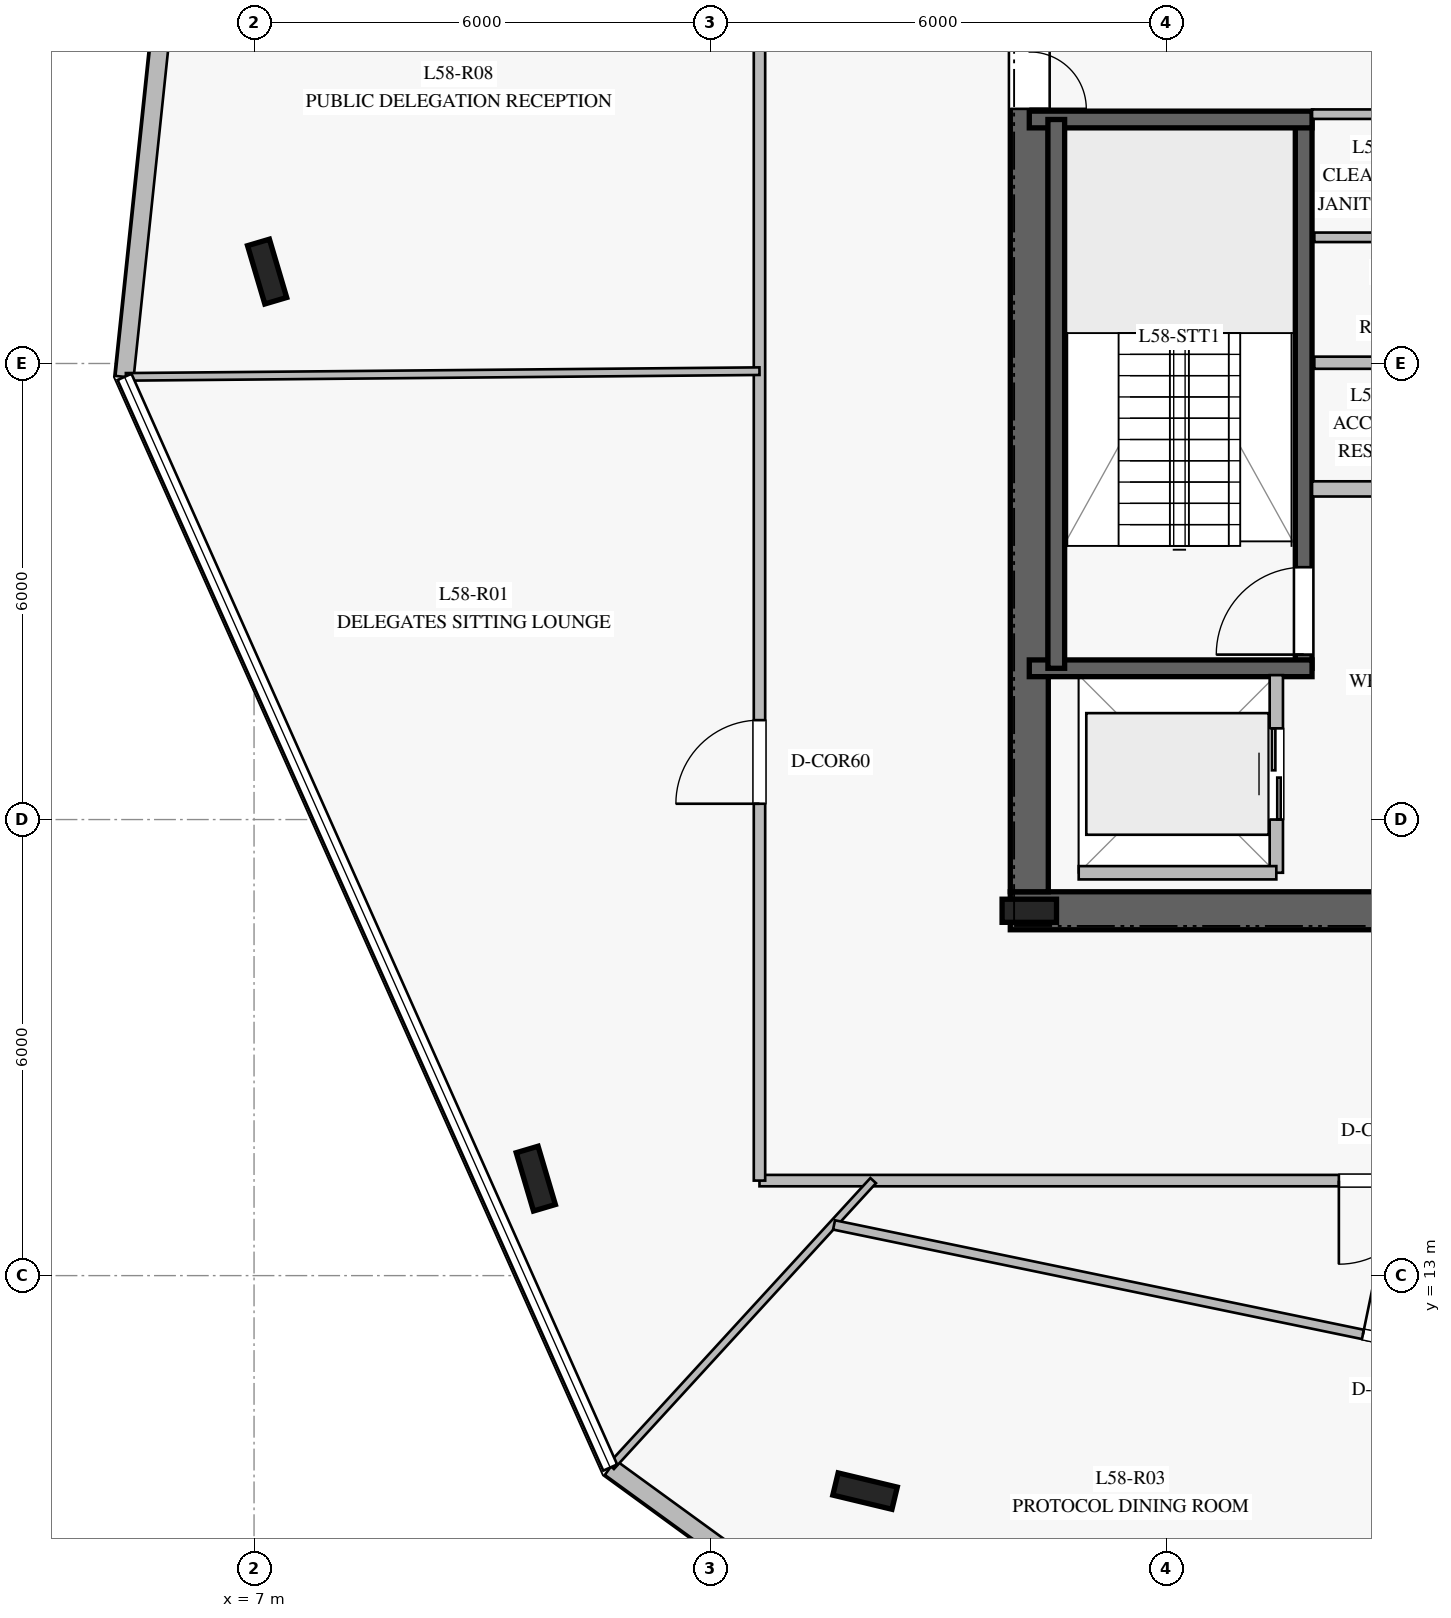
"""IFC4 building model, lengths in metres.
Left out: names, types, materials, properties, quantities, classifications, styles, units other than length and angle.
Written with IfcOpenShell. Run it as: python <this file> out.ifc"""

import sys

from ifc_helpers import new_model, si_unit, direction, frame, frame_2d, origin, origin_2d, place, context, subcontext, project, spatial, rectangle, i_section, extrude, element, fill, save


model = new_model("IFC4")
c1 = context("Model", 3, precision=1e-05, world=origin(), true_north=direction((0.0, 1.0)))
c2 = subcontext(c1, "Body", "Model", "MODEL_VIEW")
j1 = project(units=[si_unit("LENGTHUNIT", "METRE"), si_unit("PLANEANGLEUNIT", "RADIAN")], contexts=[c1])
p1 = place(None, origin())
s1 = spatial("IfcSite", under=j1, at=p1, CompositionType="ELEMENT")
p2 = place(p1, origin())
s2 = spatial("IfcBuilding", under=s1, at=p2, CompositionType="ELEMENT")
p3 = place(p2, frame((0.0, 0.0, 240.8)))
s3 = spatial("IfcBuildingStorey", under=s2, at=p3, CompositionType="ELEMENT", Elevation=240.8)
p4 = place(p3, frame((16.95, 17.8, 0.0), z_axis=(0.0, 0.0, 1.0), x_axis=(1.0, 0.0, 0.0)))
e1 = element("IfcWall", 1, at=p4, inside=s3, PredefinedType="SHEAR", context=c2, shape_type="SweptSolid", body=[
    extrude(rectangle(XDim=16.1, YDim=0.5, at=frame_2d((8.05, 0.0))), origin(), (0.0, 0.0, 1.0), 3.7),
])
p5 = place(p4, frame((5.0, 0.0, 0.0)))
e2 = element("IfcOpeningElement", 2, at=p5, cuts=e1, PredefinedType="OPENING", context=c2, shape_type="SweptSolid", body=[
    extrude(rectangle(XDim=1.2, YDim=2.25, at=frame_2d((0.6, 1.125))), frame((0.0, 0.26, 0.0), z_axis=(0.0, -1.0, 0.0), x_axis=(1.0, 0.0, 0.0)), (0.0, 0.0, 1.0), 0.52),
])
p6 = place(p4, frame((13.95, 0.0, 0.0)))
e3 = element("IfcOpeningElement", 3, at=p6, cuts=e1, PredefinedType="OPENING", context=c2, shape_type="SweptSolid", body=[
    extrude(rectangle(XDim=0.9, YDim=2.1, at=frame_2d((0.45, 1.05))), frame((0.0, 0.26, 0.0), z_axis=(0.0, -1.0, 0.0), x_axis=(1.0, 0.0, 0.0)), (0.0, 0.0, 1.0), 0.52),
])
p7 = place(p4, frame((9.2, 0.0, 0.0)))
e4 = element("IfcOpeningElement", 4, at=p7, cuts=e1, PredefinedType="OPENING", context=c2, shape_type="SweptSolid", body=[
    extrude(rectangle(XDim=1.1, YDim=2.2, at=frame_2d((0.55, 1.1))), frame((0.0, 0.26, 0.0), z_axis=(0.0, -1.0, 0.0), x_axis=(1.0, 0.0, 0.0)), (0.0, 0.0, 1.0), 0.52),
])
p8 = place(p3, frame((17.2, 31.95, 0.0), z_axis=(0.0, 0.0, 1.0), x_axis=(0.0, -1.0, 0.0)))
e5 = element("IfcWall", 5, at=p8, inside=s3, PredefinedType="SHEAR", context=c2, shape_type="SweptSolid", body=[
    extrude(rectangle(XDim=13.9, YDim=0.5, at=frame_2d((6.95, 0.0))), origin(), (0.0, 0.0, 1.0), 3.7),
])
p9 = place(p8, frame((2.1, 0.0, 0.0)))
e6 = element("IfcOpeningElement", 6, at=p9, cuts=e5, PredefinedType="OPENING", context=c2, shape_type="SweptSolid", body=[
    extrude(rectangle(XDim=1.5, YDim=2.2, at=frame_2d((0.75, 1.1))), frame((0.0, 0.26, 0.0), z_axis=(0.0, -1.0, 0.0), x_axis=(1.0, 0.0, 0.0)), (0.0, 0.0, 1.0), 0.52),
])
p10 = place(p3, frame((17.2, 17.8, 0.0), z_axis=(0.0, 0.0, 1.0), x_axis=(1.0, 0.0, 0.0)))
e7 = element("IfcColumn", 7, at=p10, inside=s3, PredefinedType="COLUMN", context=c2, shape_type="SweptSolid", body=[
    extrude(i_section(OverallWidth=0.304, OverallDepth=0.716, WebThickness=0.021, FlangeThickness=0.04, at=origin_2d()), origin(), (0.0, 0.0, 1.0), 4.0),
])
p11 = place(p3, frame((20.81, 20.99, 0.0), z_axis=(0.0, 0.0, 1.0), x_axis=(0.0, 1.0, 0.0)))
e8 = element("IfcWall", 8, at=p11, inside=s3, PredefinedType="SOLIDWALL", context=c2, shape_type="SweptSolid", body=[
    extrude(rectangle(XDim=7.22, YDim=0.22, at=frame_2d((3.61, 0.0))), origin(), (0.0, 0.0, 1.0), 3.7),
])
p12 = place(p11, frame((0.18, 0.0, 0.0)))
e9 = element("IfcOpeningElement", 9, at=p12, cuts=e8, PredefinedType="OPENING", context=c2, shape_type="SweptSolid", body=[
    extrude(rectangle(XDim=1.15, YDim=2.2, at=frame_2d((0.575, 1.1))), frame((0.0, 0.12, 0.0), z_axis=(0.0, -1.0, 0.0), x_axis=(1.0, 0.0, 0.0)), (0.0, 0.0, 1.0), 0.24),
])
for number, where, z_axis, x_axis in (
    (10, (17.2, 20.99, 0.0), (0.0, 0.0, 1.0), (1.0, 0.0, 0.0)),
    (11, (17.2, 28.21, 0.0), (0.0, 0.0, 1.0), (1.0, 0.0, 0.0)),
):
    element("IfcWall", number, at=place(p3, frame(where, z_axis=z_axis, x_axis=x_axis)), inside=s3, PredefinedType="SOLIDWALL", context=c2, shape_type="SweptSolid", body=[
        extrude(rectangle(XDim=3.72, YDim=0.22, at=frame_2d((1.86, 0.0))), origin(), (0.0, 0.0, 1.0), 3.7),
    ])
p13 = place(p3, frame((17.555, 28.21, 0.0), z_axis=(0.0, 0.0, 1.0), x_axis=(0.0, -1.0, 0.0)))
e12 = element("IfcWall", 12, at=p13, inside=s3, PredefinedType="SOLIDWALL", context=c2, shape_type="SweptSolid", body=[
    extrude(rectangle(XDim=7.22, YDim=0.22, at=frame_2d((3.61, 0.0))), origin(), (0.0, 0.0, 1.0), 3.7),
])
for number, where, z_axis, x_axis in (
    (13, (7.172, 26.209, 0.0), (0.0, 0.0, 1.0), (-0.284, 0.959, 0.0)),
    (14, (10.707, 14.276, 0.0), (0.0, 0.0, 1.0), (-0.284, 0.959, 0.0)),
    (15, (15.039, 10.165, 0.0), (0.0, 0.0, 1.0), (-0.972, 0.233, 0.0)),
):
    element("IfcColumn", number, at=place(p3, frame(where, z_axis=z_axis, x_axis=x_axis)), inside=s3, PredefinedType="COLUMN", context=c2, shape_type="SweptSolid", body=[
        extrude(i_section(OverallWidth=0.3, OverallDepth=0.8, WebThickness=0.018, FlangeThickness=0.033, at=origin_2d()), origin(), (0.0, 0.0, 1.0), 4.0),
    ])
p14 = place(p3, frame((5.764, 29.269, 0.0), z_axis=(0.0, 0.0, 1.0), x_axis=(-0.104710374516, -0.994502758904, 0.0)))
e16 = element("IfcWall", 16, at=p14, inside=s3, PredefinedType="STANDARD", context=c2, shape_type="SweptSolid", body=[
    extrude(rectangle(XDim=4.47, YDim=0.24, at=frame_2d((2.235, 0.0))), origin(), (0.0, 0.0, 1.0), 3.7),
])
p15 = place(p3, frame((11.686, 10.475, 0.0), z_axis=(0.0, 0.0, 1.0), x_axis=(0.808861298874, -0.587999489102, 0.0)))
e17 = element("IfcWall", 17, at=p15, inside=s3, PredefinedType="STANDARD", context=c2, shape_type="SweptSolid", body=[
    extrude(rectangle(XDim=4.468, YDim=0.24, at=frame_2d((2.234, 0.0))), origin(), (0.0, 0.0, 1.0), 3.7),
])
p16 = place(p3, frame((20.92, 23.35, 0.0), z_axis=(0.0, 0.0, 1.0), x_axis=(1.0, 0.0, 0.0)))
e18 = element("IfcWall", 18, at=p16, inside=s3, PredefinedType="PARTITIONING", context=c2, shape_type="SweptSolid", body=[
    extrude(rectangle(XDim=3.38, YDim=0.2, at=frame_2d((1.69, 0.0))), origin(), (0.0, 0.0, 1.0), 3.7),
])
p17 = place(p3, frame((20.92, 28.28, 0.0), z_axis=(0.0, 0.0, 1.0), x_axis=(1.0, 0.0, 0.0)))
e19 = element("IfcWall", 19, at=p17, inside=s3, PredefinedType="PARTITIONING", context=c2, shape_type="SweptSolid", body=[
    extrude(rectangle(XDim=3.405, YDim=0.125, at=frame_2d((1.703, 0.0))), origin(), (0.0, 0.0, 1.0), 3.7),
])
p18 = place(p3, frame((20.95, 25.01, 0.0), z_axis=(0.0, 0.0, 1.0), x_axis=(1.0, 0.0, 0.0)))
e20 = element("IfcWall", 20, at=p18, inside=s3, PredefinedType="PLUMBINGWALL", context=c2, shape_type="SweptSolid", body=[
    extrude(rectangle(XDim=3.3, YDim=0.16, at=frame_2d((1.65, 0.0))), origin(), (0.0, 0.0, 1.0), 3.7),
])
p19 = place(p3, frame((20.95, 26.66, 0.0), z_axis=(0.0, 0.0, 1.0), x_axis=(1.0, 0.0, 0.0)))
e21 = element("IfcWall", 21, at=p19, inside=s3, PredefinedType="PARTITIONING", context=c2, shape_type="SweptSolid", body=[
    extrude(rectangle(XDim=3.3, YDim=0.125, at=frame_2d((1.65, 0.0))), origin(), (0.0, 0.0, 1.0), 3.7),
])
p20 = place(p3, frame((20.45, 18.3, 0.0), z_axis=(0.0, 0.0, 1.0), x_axis=(0.0, 1.0, 0.0)))
e22 = element("IfcWall", 22, at=p20, inside=s3, PredefinedType="PARTITIONING", context=c2, shape_type="SweptSolid", body=[
    extrude(rectangle(XDim=2.6, YDim=0.175, at=frame_2d((1.3, 0.0))), origin(), (0.0, 0.0, 1.0), 3.7),
])
p21 = place(p20, frame((0.7, 0.0, 0.0)))
e23 = element("IfcOpeningElement", 23, at=p21, cuts=e22, PredefinedType="OPENING", context=c2, shape_type="SweptSolid", body=[
    extrude(rectangle(XDim=1.2, YDim=2.2, at=frame_2d((0.6, 1.1))), frame((0.0, 0.098, 0.0), z_axis=(0.0, -1.0, 0.0), x_axis=(1.0, 0.0, 0.0)), (0.0, 0.0, 1.0), 0.195),
])
p22 = place(p3, frame((17.85, 18.3, 0.0), z_axis=(0.0, 0.0, 1.0), x_axis=(1.0, 0.0, 0.0)))
e24 = element("IfcWall", 24, at=p22, inside=s3, PredefinedType="PARTITIONING", context=c2, shape_type="SweptSolid", body=[
    extrude(rectangle(XDim=2.6, YDim=0.175, at=frame_2d((1.3, 0.0))), origin(), (0.0, 0.0, 1.0), 3.7),
])
p23 = place(p3, frame((36.35, 14.25, 0.0), z_axis=(0.0, 0.0, 1.0), x_axis=(-1.0, 0.0, 0.0)))
e25 = element("IfcWall", 25, at=p23, inside=s3, PredefinedType="PARTITIONING", context=c2, shape_type="SweptSolid", body=[
    extrude(rectangle(XDim=22.7, YDim=0.15, at=frame_2d((11.35, 0.0))), origin(), (0.0, 0.0, 1.0), 3.2),
])
p24 = place(p23, frame((13.977, 0.0, 0.0)))
e26 = element("IfcOpeningElement", 26, at=p24, cuts=e25, PredefinedType="OPENING", context=c2, shape_type="SweptSolid", body=[
    extrude(rectangle(XDim=1.1, YDim=2.2, at=frame_2d((0.55, 1.1))), frame((0.0, 0.085, 0.0), z_axis=(0.0, -1.0, 0.0), x_axis=(1.0, 0.0, 0.0)), (0.0, 0.0, 1.0), 0.17),
])
p25 = place(p3, frame((13.65, 14.25, 0.0), z_axis=(0.0, 0.0, 1.0), x_axis=(0.0, 1.0, 0.0)))
e27 = element("IfcWall", 27, at=p25, inside=s3, PredefinedType="PARTITIONING", context=c2, shape_type="SweptSolid", body=[
    extrude(rectangle(XDim=21.5, YDim=0.15, at=frame_2d((10.75, 0.0))), origin(), (0.0, 0.0, 1.0), 3.2),
])
p26 = place(p25, frame((4.958, 0.0, 0.0)))
e28 = element("IfcOpeningElement", 28, at=p26, cuts=e27, PredefinedType="OPENING", context=c2, shape_type="SweptSolid", body=[
    extrude(rectangle(XDim=1.1, YDim=2.2, at=frame_2d((0.55, 1.1))), frame((0.0, 0.085, 0.0), z_axis=(0.0, -1.0, 0.0), x_axis=(1.0, 0.0, 0.0)), (0.0, 0.0, 1.0), 0.17),
])
p27 = place(p25, frame((15.251, 0.0, 0.0)))
e29 = element("IfcOpeningElement", 29, at=p27, cuts=e27, PredefinedType="OPENING", context=c2, shape_type="SweptSolid", body=[
    extrude(rectangle(XDim=1.1, YDim=2.2, at=frame_2d((0.55, 1.1))), frame((0.0, 0.085, 0.0), z_axis=(0.0, -1.0, 0.0), x_axis=(1.0, 0.0, 0.0)), (0.0, 0.0, 1.0), 0.17),
])
p28 = place(p3, frame((13.65, 24.899, 0.0), z_axis=(0.0, 0.0, 1.0), x_axis=(-0.999959580436, -0.008990967408, 0.0)))
e30 = element("IfcWall", 30, at=p28, inside=s3, PredefinedType="MOVABLE", context=c2, shape_type="SweptSolid", body=[
    extrude(rectangle(XDim=8.336, YDim=0.1, at=frame_2d((4.168, 0.0))), origin(), (0.0, 0.0, 1.0), 3.1),
])
p29 = place(p3, frame((15.146, 14.25, 0.0), z_axis=(0.0, 0.0, 1.0), x_axis=(-0.675770128833, -0.737112428994, 0.0)))
e31 = element("IfcWall", 31, at=p29, inside=s3, PredefinedType="MOVABLE", context=c2, shape_type="SweptSolid", body=[
    extrude(rectangle(XDim=5.102, YDim=0.1, at=frame_2d((2.551, 0.0))), origin(), (0.0, 0.0, 1.0), 3.1),
])
p30 = place(p3, frame((14.631, 13.667, 0.0), z_axis=(0.0, 0.0, 1.0), x_axis=(0.979233619367, -0.202735094894, 0.0)))
e32 = element("IfcWall", 32, at=p30, inside=s3, PredefinedType="PARTITIONING", context=c2, shape_type="SweptSolid", body=[
    extrude(rectangle(XDim=15.212, YDim=0.125, at=frame_2d((7.606, 0.0))), origin(), (0.0, 0.0, 1.0), 3.2),
])
p31 = place(p30, frame((7.106, 0.0, 0.0)))
e33 = element("IfcOpeningElement", 33, at=p31, cuts=e32, PredefinedType="OPENING", context=c2, shape_type="SweptSolid", body=[
    extrude(rectangle(XDim=1.0, YDim=2.15, at=frame_2d((0.5, 1.075))), frame((0.0, 0.073, 0.0), z_axis=(0.0, -1.0, 0.0), x_axis=(1.0, 0.0, 0.0)), (0.0, 0.0, 1.0), 0.145),
])
p32 = place(p12, origin())
e34 = element("IfcDoor", 34, at=p32, inside=s3, OperationType="SINGLE_SWING_LEFT", PredefinedType="DOOR", context=c2, shape_type="SweptSolid", body=[
    extrude(rectangle(XDim=1.15, YDim=2.2, at=frame_2d((0.575, 1.1))), frame((0.0, 0.025, 0.0), z_axis=(0.0, -1.0, 0.0), x_axis=(1.0, 0.0, 0.0)), (0.0, 0.0, 1.0), 0.05),
])
fill(e9, e34)
p33 = place(p9, origin())
e35 = element("IfcDoor", 35, at=p33, inside=s3, OperationType="DOUBLE_DOOR_SINGLE_SWING", PredefinedType="DOOR", context=c2, shape_type="SweptSolid", body=[
    extrude(rectangle(XDim=1.5, YDim=2.2, at=frame_2d((0.75, 1.1))), frame((0.0, 0.025, 0.0), z_axis=(0.0, -1.0, 0.0), x_axis=(1.0, 0.0, 0.0)), (0.0, 0.0, 1.0), 0.05),
])
fill(e6, e35)
p34 = place(p21, origin())
e36 = element("IfcDoor", 36, at=p34, inside=s3, OperationType="DOUBLE_DOOR_SLIDING", PredefinedType="DOOR", context=c2, shape_type="SweptSolid", body=[
    extrude(rectangle(XDim=1.2, YDim=2.2, at=frame_2d((0.6, 1.1))), frame((0.0, 0.025, 0.0), z_axis=(0.0, -1.0, 0.0), x_axis=(1.0, 0.0, 0.0)), (0.0, 0.0, 1.0), 0.05),
])
fill(e23, e36)
p35 = place(p26, origin())
e37 = element("IfcDoor", 37, at=p35, inside=s3, OperationType="SINGLE_SWING_LEFT", PredefinedType="DOOR", context=c2, shape_type="SweptSolid", body=[
    extrude(rectangle(XDim=1.1, YDim=2.2, at=frame_2d((0.55, 1.1))), frame((0.0, 0.025, 0.0), z_axis=(0.0, -1.0, 0.0), x_axis=(1.0, 0.0, 0.0)), (0.0, 0.0, 1.0), 0.05),
])
fill(e28, e37)
p36 = place(p24, origin())
e38 = element("IfcDoor", 38, at=p36, inside=s3, OperationType="SINGLE_SWING_RIGHT", PredefinedType="DOOR", context=c2, shape_type="SweptSolid", body=[
    extrude(rectangle(XDim=1.1, YDim=2.2, at=frame_2d((0.55, 1.1))), frame((0.0, 0.025, 0.0), z_axis=(0.0, -1.0, 0.0), x_axis=(1.0, 0.0, 0.0)), (0.0, 0.0, 1.0), 0.05),
])
fill(e26, e38)
p37 = place(p31, origin())
e39 = element("IfcDoor", 39, at=p37, inside=s3, OperationType="SINGLE_SWING_LEFT", PredefinedType="DOOR", context=c2, shape_type="SweptSolid", body=[
    extrude(rectangle(XDim=1.0, YDim=2.15, at=frame_2d((0.5, 1.075))), frame((0.0, 0.025, 0.0), z_axis=(0.0, -1.0, 0.0), x_axis=(1.0, 0.0, 0.0)), (0.0, 0.0, 1.0), 0.05),
])
fill(e33, e39)
save(model, sys.argv[1])
